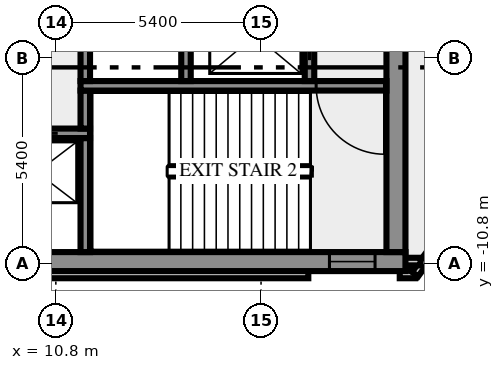
"""IFC4 building model, lengths in metres.
Left out: names, types, materials, properties, quantities, classifications, styles, units other than length and angle.
Written with IfcOpenShell. Run it as: python <this file> out.ifc"""

import sys

from ifc_helpers import new_model, si_unit, direction, frame, frame_2d, origin, place, context, subcontext, project, spatial, rectangle, extrude, element, fill, save


model = new_model("IFC4")
c1 = context("Model", 3, precision=1e-05, world=origin(), true_north=direction((0.0, 1.0)))
c2 = subcontext(c1, "Body", "Model", "MODEL_VIEW")
j1 = project(units=[si_unit("LENGTHUNIT", "METRE"), si_unit("PLANEANGLEUNIT", "RADIAN")], contexts=[c1])
p1 = place(None, origin())
s1 = spatial("IfcSite", under=j1, at=p1, CompositionType="ELEMENT")
p2 = place(p1, origin())
s2 = spatial("IfcBuilding", under=s1, at=p2, CompositionType="ELEMENT")
p3 = place(p2, frame((0.0, 0.0, 230.0)))
s3 = spatial("IfcBuildingStorey", under=s2, at=p3, CompositionType="ELEMENT", Elevation=230.0)
p4 = place(p3, frame((-17.444, -11.088, 0.0), z_axis=(0.0, 0.0, 1.0), x_axis=(1.0, 0.0, 0.0)))
e1 = element("IfcWall", 1, at=p4, inside=s3, PredefinedType="SOLIDWALL", context=c2, shape_type="SweptSolid", body=[
    extrude(rectangle(XDim=34.888, YDim=0.2, at=frame_2d((17.444, 0.0))), origin(), (0.0, 0.0, 1.0), 3.65),
])
p5 = place(p3, frame((19.85, -11.088, 0.0), z_axis=(0.0, 0.0, 1.0), x_axis=(1.0, 0.0, 0.0)))
e2 = element("IfcWall", 2, at=p5, inside=s3, PredefinedType="SOLIDWALL", context=c2, shape_type="SweptSolid", body=[
    extrude(rectangle(XDim=0.406, YDim=0.2, at=frame_2d((0.203, 0.0))), origin(), (0.0, 0.0, 1.0), 3.65),
])
p6 = place(p3, frame((20.253, -11.083, 0.0), z_axis=(0.0, 0.0, 1.0), x_axis=(0.587766567315, 0.809030569476, 0.0)))
e3 = element("IfcWall", 3, at=p6, inside=s3, PredefinedType="SOLIDWALL", context=c2, shape_type="SweptSolid", body=[
    extrude(rectangle(XDim=2.688, YDim=0.2, at=frame_2d((1.344, 0.0))), origin(), (0.0, 0.0, 1.0), 3.65),
])
p7 = place(p3, frame((19.98, -10.75, 0.0), z_axis=(0.0, 0.0, 1.0), x_axis=(1.0, 0.0, 0.0)))
e4 = element("IfcWall", 4, at=p7, inside=s3, PredefinedType="SOLIDWALL", context=c2, shape_type="SweptSolid", body=[
    extrude(rectangle(XDim=0.417, YDim=0.2, at=frame_2d((0.208, 0.0))), origin(), (0.0, 0.0, 1.0), 3.65),
])
p8 = place(p3, frame((-20.0, -10.75, 0.0), z_axis=(0.0, 0.0, 1.0), x_axis=(1.0, 0.0, 0.0)))
e5 = element("IfcWall", 5, at=p8, inside=s3, PredefinedType="SHEAR", context=c2, shape_type="SweptSolid", body=[
    extrude(rectangle(XDim=40.0, YDim=0.5, at=frame_2d((20.0, 0.0))), origin(), (0.0, 0.0, 1.0), 3.65),
])
p9 = place(p8, frame((0.8, 0.0, 1.0)))
e6 = element("IfcOpeningElement", 6, at=p9, cuts=e5, PredefinedType="OPENING", context=c2, shape_type="SweptSolid", body=[
    extrude(rectangle(XDim=1.2, YDim=1.2, at=frame_2d((0.6, 0.6))), frame((0.0, 0.26, 0.0), z_axis=(0.0, -1.0, 0.0), x_axis=(1.0, 0.0, 0.0)), (0.0, 0.0, 1.0), 0.52),
])
p10 = place(p8, frame((38.0, 0.0, 1.0)))
e7 = element("IfcOpeningElement", 7, at=p10, cuts=e5, PredefinedType="OPENING", context=c2, shape_type="SweptSolid", body=[
    extrude(rectangle(XDim=1.2, YDim=1.2, at=frame_2d((0.6, 0.6))), frame((0.0, 0.26, 0.0), z_axis=(0.0, -1.0, 0.0), x_axis=(1.0, 0.0, 0.0)), (0.0, 0.0, 1.0), 0.52),
])
p11 = place(p3, frame((11.575, -10.5, 0.0), z_axis=(0.0, 0.0, 1.0), x_axis=(0.0, 1.0, 0.0)))
e8 = element("IfcWall", 8, at=p11, inside=s3, PredefinedType="SHEAR", context=c2, shape_type="SweptSolid", body=[
    extrude(rectangle(XDim=3.0, YDim=0.25, at=frame_2d((1.5, 0.0))), origin(), (0.0, 0.0, 1.0), 3.65),
])
p12 = place(p3, frame((19.75, -10.5, 0.0), z_axis=(0.0, 0.0, 1.0), x_axis=(0.0, 1.0, 0.0)))
e9 = element("IfcWall", 9, at=p12, inside=s3, PredefinedType="SHEAR", context=c2, shape_type="SweptSolid", body=[
    extrude(rectangle(XDim=8.8, YDim=0.5, at=frame_2d((4.4, 0.0))), origin(), (0.0, 0.0, 1.0), 3.65),
])
p13 = place(p3, frame((11.7, -7.375, 0.0), z_axis=(0.0, 0.0, 1.0), x_axis=(-1.0, 0.0, 0.0)))
e10 = element("IfcWall", 10, at=p13, inside=s3, PredefinedType="SHEAR", context=c2, shape_type="SweptSolid", body=[
    extrude(rectangle(XDim=23.4, YDim=0.25, at=frame_2d((11.7, 0.0))), origin(), (0.0, 0.0, 1.0), 3.65),
])
p14 = place(p13, frame((19.05, 0.0, 0.0)))
e11 = element("IfcOpeningElement", 11, at=p14, cuts=e10, PredefinedType="OPENING", context=c2, shape_type="SweptSolid", body=[
    extrude(rectangle(XDim=0.9, YDim=2.1, at=frame_2d((0.45, 1.05))), frame((0.0, 0.135, 0.0), z_axis=(0.0, -1.0, 0.0), x_axis=(1.0, 0.0, 0.0)), (0.0, 0.0, 1.0), 0.27),
])
p15 = place(p13, frame((14.55, 0.0, 0.0)))
e12 = element("IfcOpeningElement", 12, at=p15, cuts=e10, PredefinedType="OPENING", context=c2, shape_type="SweptSolid", body=[
    extrude(rectangle(XDim=0.8, YDim=2.1, at=frame_2d((0.4, 1.05))), frame((0.0, 0.135, 0.0), z_axis=(0.0, -1.0, 0.0), x_axis=(1.0, 0.0, 0.0)), (0.0, 0.0, 1.0), 0.27),
])
p16 = place(p13, frame((12.8, 0.0, 0.0)))
e13 = element("IfcOpeningElement", 13, at=p16, cuts=e10, PredefinedType="OPENING", context=c2, shape_type="SweptSolid", body=[
    extrude(rectangle(XDim=0.9, YDim=2.1, at=frame_2d((0.45, 1.05))), frame((0.0, 0.135, 0.0), z_axis=(0.0, -1.0, 0.0), x_axis=(1.0, 0.0, 0.0)), (0.0, 0.0, 1.0), 0.27),
])
p17 = place(p13, frame((10.7, 0.0, 0.0)))
e14 = element("IfcOpeningElement", 14, at=p17, cuts=e10, PredefinedType="OPENING", context=c2, shape_type="SweptSolid", body=[
    extrude(rectangle(XDim=0.9, YDim=2.1, at=frame_2d((0.45, 1.05))), frame((0.0, 0.135, 0.0), z_axis=(0.0, -1.0, 0.0), x_axis=(1.0, 0.0, 0.0)), (0.0, 0.0, 1.0), 0.27),
])
p18 = place(p13, frame((8.35, 0.0, 0.0)))
e15 = element("IfcOpeningElement", 15, at=p18, cuts=e10, PredefinedType="OPENING", context=c2, shape_type="SweptSolid", body=[
    extrude(rectangle(XDim=1.1, YDim=2.1, at=frame_2d((0.55, 1.05))), frame((0.0, 0.135, 0.0), z_axis=(0.0, -1.0, 0.0), x_axis=(1.0, 0.0, 0.0)), (0.0, 0.0, 1.0), 0.27),
])
p19 = place(p13, frame((5.85, 0.0, 0.0)))
e16 = element("IfcOpeningElement", 16, at=p19, cuts=e10, PredefinedType="OPENING", context=c2, shape_type="SweptSolid", body=[
    extrude(rectangle(XDim=1.1, YDim=2.1, at=frame_2d((0.55, 1.05))), frame((0.0, 0.135, 0.0), z_axis=(0.0, -1.0, 0.0), x_axis=(1.0, 0.0, 0.0)), (0.0, 0.0, 1.0), 0.27),
])
p20 = place(p13, frame((3.35, 0.0, 0.0)))
e17 = element("IfcOpeningElement", 17, at=p20, cuts=e10, PredefinedType="OPENING", context=c2, shape_type="SweptSolid", body=[
    extrude(rectangle(XDim=1.1, YDim=2.1, at=frame_2d((0.55, 1.05))), frame((0.0, 0.135, 0.0), z_axis=(0.0, -1.0, 0.0), x_axis=(1.0, 0.0, 0.0)), (0.0, 0.0, 1.0), 0.27),
])
p21 = place(p13, frame((0.85, 0.0, 0.0)))
e18 = element("IfcOpeningElement", 18, at=p21, cuts=e10, PredefinedType="OPENING", context=c2, shape_type="SweptSolid", body=[
    extrude(rectangle(XDim=1.1, YDim=2.1, at=frame_2d((0.55, 1.05))), frame((0.0, 0.135, 0.0), z_axis=(0.0, -1.0, 0.0), x_axis=(1.0, 0.0, 0.0)), (0.0, 0.0, 1.0), 0.27),
])
p22 = place(p3, frame((11.575, -7.25, 0.0), z_axis=(0.0, 0.0, 1.0), x_axis=(0.0, 1.0, 0.0)))
e19 = element("IfcWall", 19, at=p22, inside=s3, PredefinedType="SHEAR", context=c2, shape_type="SweptSolid", body=[
    extrude(rectangle(XDim=1.0, YDim=0.25, at=frame_2d((0.5, 0.0))), origin(), (0.0, 0.0, 1.0), 3.65),
])
p23 = place(p3, frame((19.5, -6.125, 0.0), z_axis=(0.0, 0.0, 1.0), x_axis=(-1.0, 0.0, 0.0)))
e20 = element("IfcWall", 20, at=p23, inside=s3, PredefinedType="SHEAR", context=c2, shape_type="SweptSolid", body=[
    extrude(rectangle(XDim=8.05, YDim=0.25, at=frame_2d((4.025, 0.0))), origin(), (0.0, 0.0, 1.0), 3.65),
])
p24 = place(p23, frame((0.05, 0.0, 0.0)))
e21 = element("IfcOpeningElement", 21, at=p24, cuts=e20, PredefinedType="OPENING", context=c2, shape_type="SweptSolid", body=[
    extrude(rectangle(XDim=1.8, YDim=2.1, at=frame_2d((0.9, 1.05))), frame((0.0, 0.135, 0.0), z_axis=(0.0, -1.0, 0.0), x_axis=(1.0, 0.0, 0.0)), (0.0, 0.0, 1.0), 0.27),
])
for number, where, z_axis, x_axis in (
    (22, (11.575, -6.0, 0.0), (0.0, 0.0, 1.0), (0.0, 1.0, 0.0)),
    (23, (14.225, -6.0, 0.0), (0.0, 0.0, 1.0), (0.0, 1.0, 0.0)),
):
    element("IfcWall", number, at=place(p3, frame(where, z_axis=z_axis, x_axis=x_axis)), inside=s3, PredefinedType="SHEAR", context=c2, shape_type="SweptSolid", body=[
        extrude(rectangle(XDim=1.75, YDim=0.25, at=frame_2d((0.875, 0.0))), origin(), (0.0, 0.0, 1.0), 3.65),
    ])
p25 = place(p3, frame((17.475, -6.0, 0.0), z_axis=(0.0, 0.0, 1.0), x_axis=(0.0, 1.0, 0.0)))
e24 = element("IfcWall", 24, at=p25, inside=s3, PredefinedType="SHEAR", context=c2, shape_type="SweptSolid", body=[
    extrude(rectangle(XDim=4.3, YDim=0.25, at=frame_2d((2.15, 0.0))), origin(), (0.0, 0.0, 1.0), 3.65),
])
p26 = place(p25, frame((0.55, 0.0, 0.0)))
e25 = element("IfcOpeningElement", 25, at=p26, cuts=e24, PredefinedType="OPENING", context=c2, shape_type="SweptSolid", body=[
    extrude(rectangle(XDim=1.3, YDim=2.1, at=frame_2d((0.65, 1.05))), frame((0.0, 0.135, 0.0), z_axis=(0.0, -1.0, 0.0), x_axis=(1.0, 0.0, 0.0)), (0.0, 0.0, 1.0), 0.27),
])
p27 = place(p10, origin())
e26 = element("IfcWindow", 26, at=p27, inside=s3, PartitioningType="SINGLE_PANEL", PredefinedType="WINDOW", context=c2, shape_type="SweptSolid", body=[
    extrude(rectangle(XDim=1.2, YDim=1.2, at=frame_2d((0.6, 0.6))), frame((0.0, 0.03, 0.0), z_axis=(0.0, -1.0, 0.0), x_axis=(1.0, 0.0, 0.0)), (0.0, 0.0, 1.0), 0.06),
])
fill(e7, e26)
p28 = place(p21, origin())
e27 = element("IfcDoor", 27, at=p28, inside=s3, OperationType="DOUBLE_DOOR_SLIDING", PredefinedType="DOOR", context=c2, shape_type="SweptSolid", body=[
    extrude(rectangle(XDim=1.1, YDim=2.1, at=frame_2d((0.55, 1.05))), frame((0.0, 0.025, 0.0), z_axis=(0.0, -1.0, 0.0), x_axis=(1.0, 0.0, 0.0)), (0.0, 0.0, 1.0), 0.05),
])
fill(e18, e27)
p29 = place(p24, origin())
e28 = element("IfcDoor", 28, at=p29, inside=s3, OperationType="DOUBLE_DOOR_SINGLE_SWING", PredefinedType="DOOR", context=c2, shape_type="SweptSolid", body=[
    extrude(rectangle(XDim=1.8, YDim=2.1, at=frame_2d((0.9, 1.05))), frame((0.0, 0.025, 0.0), z_axis=(0.0, -1.0, 0.0), x_axis=(1.0, 0.0, 0.0)), (0.0, 0.0, 1.0), 0.05),
])
fill(e21, e28)
p30 = place(p26, origin())
e29 = element("IfcDoor", 29, at=p30, inside=s3, OperationType="DOUBLE_DOOR_SLIDING", PredefinedType="DOOR", context=c2, shape_type="SweptSolid", body=[
    extrude(rectangle(XDim=1.3, YDim=2.1, at=frame_2d((0.65, 1.05))), frame((0.0, 0.025, 0.0), z_axis=(0.0, -1.0, 0.0), x_axis=(1.0, 0.0, 0.0)), (0.0, 0.0, 1.0), 0.05),
])
fill(e25, e29)
save(model, sys.argv[1])
